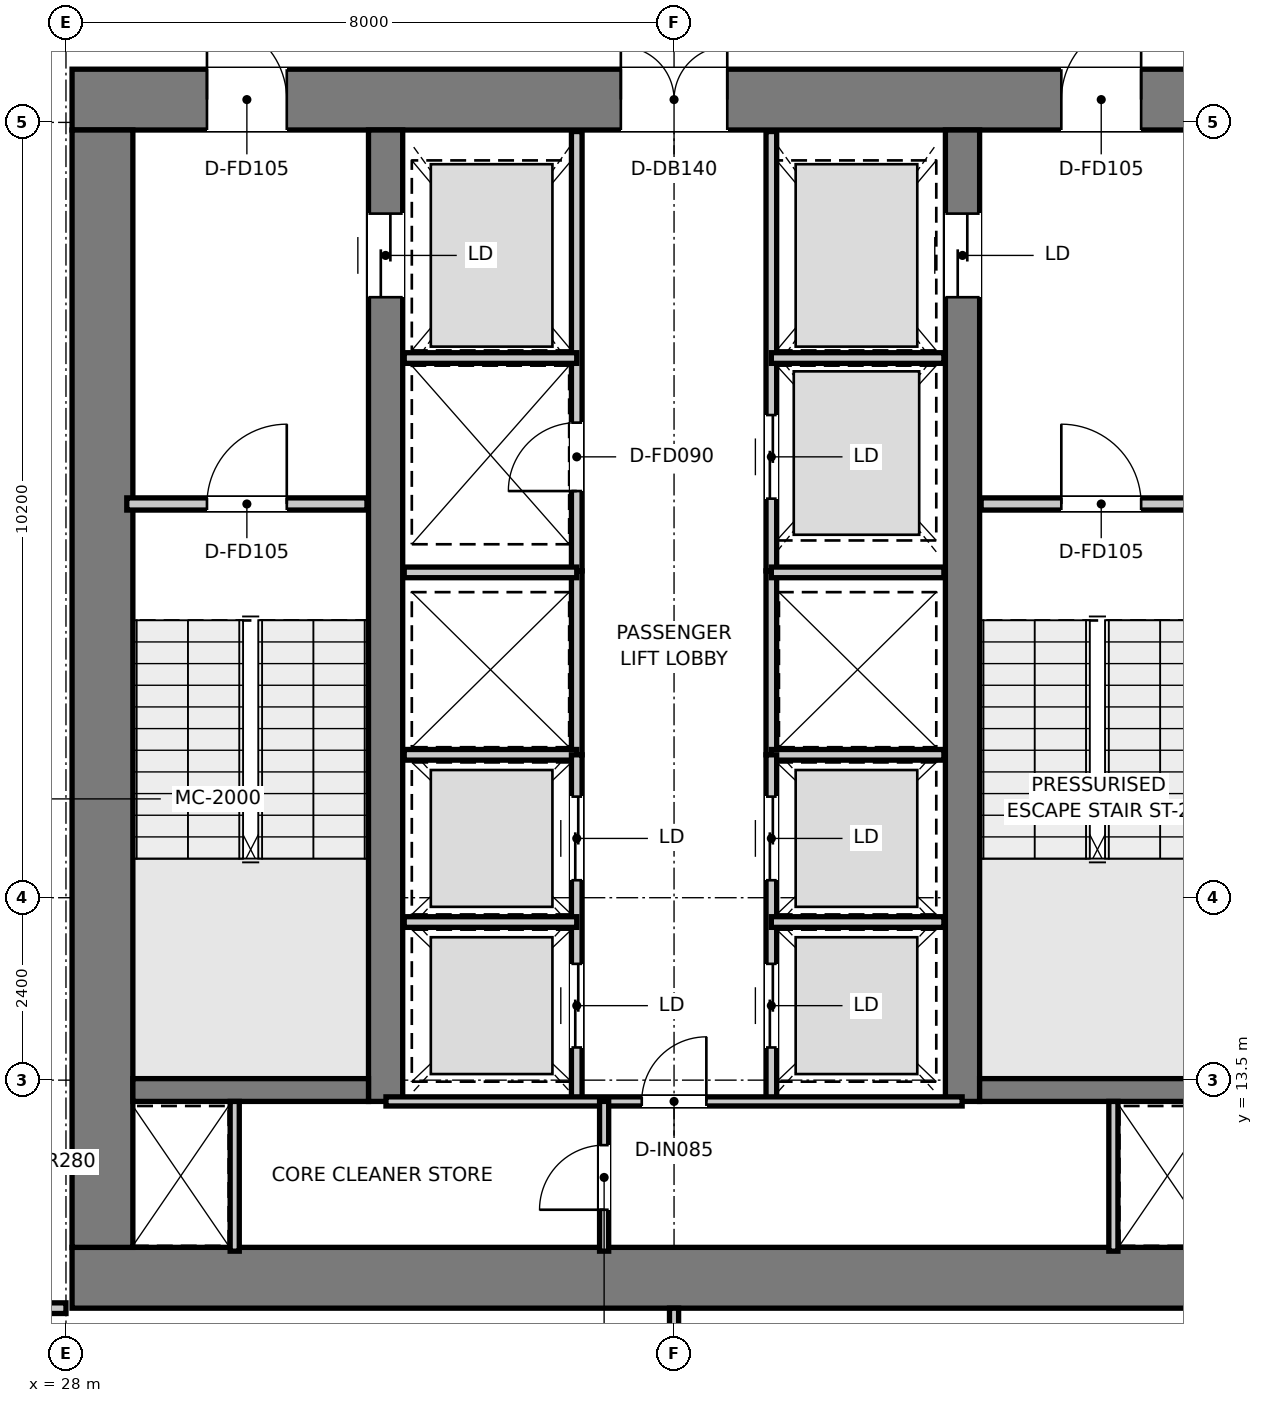
"""IFC4 building model, lengths in metres.
Left out: names, types, materials, properties, quantities, classifications, styles, units other than length and angle.
Written with IfcOpenShell. Run it as: python <this file> out.ifc"""

import sys

from ifc_helpers import new_model, si_unit, direction, frame, frame_2d, origin, place, context, subcontext, project, spatial, rectangle, extrude, element, fill, save


model = new_model("IFC4")
c1 = context("Model", 3, precision=1e-05, world=origin(), true_north=direction((0.0, 1.0)))
c2 = subcontext(c1, "Body", "Model", "MODEL_VIEW")
j1 = project(units=[si_unit("LENGTHUNIT", "METRE"), si_unit("PLANEANGLEUNIT", "RADIAN")], contexts=[c1])
p1 = place(None, origin())
s1 = spatial("IfcSite", under=j1, at=p1, CompositionType="ELEMENT")
p2 = place(p1, origin())
s2 = spatial("IfcBuilding", under=s1, at=p2, CompositionType="ELEMENT")
p3 = place(p2, frame((0.0, 0.0, 97.95)))
s3 = spatial("IfcBuildingStorey", under=s2, at=p3, CompositionType="ELEMENT", Elevation=97.95)
p4 = place(p3, frame((28.08, 10.9, 0.0), z_axis=(0.0, 0.0, 1.0), x_axis=(1.0, 0.0, 0.0)))
e1 = element("IfcWall", 1, at=p4, inside=s3, PredefinedType="SHEAR", context=c2, shape_type="SweptSolid", body=[
    extrude(rectangle(XDim=15.84, YDim=0.8, at=frame_2d((7.92, 0.0))), origin(), (0.0, 0.0, 1.0), 3.95),
])
p5 = place(p3, frame((28.08, 26.4, 0.0), z_axis=(0.0, 0.0, 1.0), x_axis=(1.0, 0.0, 0.0)))
e2 = element("IfcWall", 2, at=p5, inside=s3, PredefinedType="SHEAR", context=c2, shape_type="SweptSolid", body=[
    extrude(rectangle(XDim=15.84, YDim=0.8, at=frame_2d((7.92, 0.0))), origin(), (0.0, 0.0, 1.0), 3.95),
])
p6 = place(p5, frame((7.22, 0.0, 0.0)))
e3 = element("IfcOpeningElement", 3, at=p6, cuts=e2, PredefinedType="OPENING", context=c2, shape_type="SweptSolid", body=[
    extrude(rectangle(XDim=1.4, YDim=2.2, at=frame_2d((0.7, 1.1))), frame((0.0, 0.41, 0.0), z_axis=(0.0, -1.0, 0.0), x_axis=(1.0, 0.0, 0.0)), (0.0, 0.0, 1.0), 0.82),
])
p7 = place(p5, frame((1.775, 0.0, 0.0)))
e4 = element("IfcOpeningElement", 4, at=p7, cuts=e2, PredefinedType="OPENING", context=c2, shape_type="SweptSolid", body=[
    extrude(rectangle(XDim=1.05, YDim=2.1, at=frame_2d((0.525, 1.05))), frame((0.0, 0.41, 0.0), z_axis=(0.0, -1.0, 0.0), x_axis=(1.0, 0.0, 0.0)), (0.0, 0.0, 1.0), 0.82),
])
p8 = place(p5, frame((13.015, 0.0, 0.0)))
e5 = element("IfcOpeningElement", 5, at=p8, cuts=e2, PredefinedType="OPENING", context=c2, shape_type="SweptSolid", body=[
    extrude(rectangle(XDim=1.05, YDim=2.1, at=frame_2d((0.525, 1.05))), frame((0.0, 0.41, 0.0), z_axis=(0.0, -1.0, 0.0), x_axis=(1.0, 0.0, 0.0)), (0.0, 0.0, 1.0), 0.82),
])
p9 = place(p3, frame((28.48, 11.3, 0.0), z_axis=(0.0, 0.0, 1.0), x_axis=(0.0, 1.0, 0.0)))
e6 = element("IfcWall", 6, at=p9, inside=s3, PredefinedType="SHEAR", context=c2, shape_type="SweptSolid", body=[
    extrude(rectangle(XDim=14.7, YDim=0.8, at=frame_2d((7.35, 0.0))), origin(), (0.0, 0.0, 1.0), 3.95),
])
p10 = place(p3, frame((32.205, 13.22, 0.0), z_axis=(0.0, 0.0, 1.0), x_axis=(0.0, 1.0, 0.0)))
e7 = element("IfcWall", 7, at=p10, inside=s3, PredefinedType="SHEAR", context=c2, shape_type="SweptSolid", body=[
    extrude(rectangle(XDim=12.78, YDim=0.45, at=frame_2d((6.39, 0.0))), origin(), (0.0, 0.0, 1.0), 3.95),
])
p11 = place(p10, frame((10.58, 0.0, 0.0)))
e8 = element("IfcOpeningElement", 8, at=p11, cuts=e7, PredefinedType="OPENING", context=c2, shape_type="SweptSolid", body=[
    extrude(rectangle(XDim=1.1, YDim=2.15, at=frame_2d((0.55, 1.075))), frame((0.0, 0.235, 0.0), z_axis=(0.0, -1.0, 0.0), x_axis=(1.0, 0.0, 0.0)), (0.0, 0.0, 1.0), 0.47),
])
p12 = place(p3, frame((39.795, 13.22, 0.0), z_axis=(0.0, 0.0, 1.0), x_axis=(0.0, 1.0, 0.0)))
e9 = element("IfcWall", 9, at=p12, inside=s3, PredefinedType="SHEAR", context=c2, shape_type="SweptSolid", body=[
    extrude(rectangle(XDim=12.78, YDim=0.45, at=frame_2d((6.39, 0.0))), origin(), (0.0, 0.0, 1.0), 3.95),
])
p13 = place(p12, frame((10.58, 0.0, 0.0)))
e10 = element("IfcOpeningElement", 10, at=p13, cuts=e9, PredefinedType="OPENING", context=c2, shape_type="SweptSolid", body=[
    extrude(rectangle(XDim=1.1, YDim=2.15, at=frame_2d((0.55, 1.075))), frame((0.0, 0.235, 0.0), z_axis=(0.0, -1.0, 0.0), x_axis=(1.0, 0.0, 0.0)), (0.0, 0.0, 1.0), 0.47),
])
for number, where, z_axis, x_axis in (
    (11, (28.88, 13.37, 0.0), (0.0, 0.0, 1.0), (1.0, 0.0, 0.0)),
    (12, (40.02, 13.37, 0.0), (0.0, 0.0, 1.0), (1.0, 0.0, 0.0)),
):
    element("IfcWall", number, at=place(p3, frame(where, z_axis=z_axis, x_axis=x_axis)), inside=s3, PredefinedType="SHEAR", context=c2, shape_type="SweptSolid", body=[
        extrude(rectangle(XDim=3.1, YDim=0.3, at=frame_2d((1.55, 0.0))), origin(), (0.0, 0.0, 1.0), 3.95),
    ])
p14 = place(p3, frame((28.8, 21.08, 0.0), z_axis=(0.0, 0.0, 1.0), x_axis=(1.0, 0.0, 0.0)))
e13 = element("IfcWall", 13, at=p14, inside=s3, PredefinedType="PARTITIONING", context=c2, shape_type="SweptSolid", body=[
    extrude(rectangle(XDim=3.16, YDim=0.16, at=frame_2d((1.58, 0.0))), origin(), (0.0, 0.0, 1.0), 3.67),
])
p15 = place(p14, frame((1.055, 0.0, 0.0)))
e14 = element("IfcOpeningElement", 14, at=p15, cuts=e13, PredefinedType="OPENING", context=c2, shape_type="SweptSolid", body=[
    extrude(rectangle(XDim=1.05, YDim=2.1, at=frame_2d((0.525, 1.05))), frame((0.0, 0.09, 0.0), z_axis=(0.0, -1.0, 0.0), x_axis=(1.0, 0.0, 0.0)), (0.0, 0.0, 1.0), 0.18),
])
p16 = place(p3, frame((40.04, 21.08, 0.0), z_axis=(0.0, 0.0, 1.0), x_axis=(1.0, 0.0, 0.0)))
e15 = element("IfcWall", 15, at=p16, inside=s3, PredefinedType="PARTITIONING", context=c2, shape_type="SweptSolid", body=[
    extrude(rectangle(XDim=3.16, YDim=0.16, at=frame_2d((1.58, 0.0))), origin(), (0.0, 0.0, 1.0), 3.67),
])
p17 = place(p16, frame((1.055, 0.0, 0.0)))
e16 = element("IfcOpeningElement", 16, at=p17, cuts=e15, PredefinedType="OPENING", context=c2, shape_type="SweptSolid", body=[
    extrude(rectangle(XDim=1.05, YDim=2.1, at=frame_2d((0.525, 1.05))), frame((0.0, 0.09, 0.0), z_axis=(0.0, -1.0, 0.0), x_axis=(1.0, 0.0, 0.0)), (0.0, 0.0, 1.0), 0.18),
])
p18 = place(p3, frame((34.72, 20.2, 0.0), z_axis=(0.0, 0.0, 1.0), x_axis=(0.0, 1.0, 0.0)))
e17 = element("IfcWall", 17, at=p18, inside=s3, PredefinedType="PARTITIONING", context=c2, shape_type="SweptSolid", body=[
    extrude(rectangle(XDim=5.78, YDim=0.14, at=frame_2d((2.89, 0.0))), origin(), (0.0, 0.0, 1.0), 2.47),
])
p19 = place(p18, frame((1.05, 0.0, 0.0)))
e18 = element("IfcOpeningElement", 18, at=p19, cuts=e17, PredefinedType="OPENING", context=c2, shape_type="SweptSolid", body=[
    extrude(rectangle(XDim=0.9, YDim=2.1, at=frame_2d((0.45, 1.05))), frame((0.0, 0.08, 0.0), z_axis=(0.0, -1.0, 0.0), x_axis=(1.0, 0.0, 0.0)), (0.0, 0.0, 1.0), 0.16),
])
p20 = place(p3, frame((37.28, 20.2, 0.0), z_axis=(0.0, 0.0, 1.0), x_axis=(0.0, 1.0, 0.0)))
e19 = element("IfcWall", 19, at=p20, inside=s3, PredefinedType="PARTITIONING", context=c2, shape_type="SweptSolid", body=[
    extrude(rectangle(XDim=5.78, YDim=0.14, at=frame_2d((2.89, 0.0))), origin(), (0.0, 0.0, 1.0), 2.47),
])
p21 = place(p20, frame((0.95, 0.0, 0.0)))
e20 = element("IfcOpeningElement", 20, at=p21, cuts=e19, PredefinedType="OPENING", context=c2, shape_type="SweptSolid", body=[
    extrude(rectangle(XDim=1.1, YDim=2.15, at=frame_2d((0.55, 1.075))), frame((0.0, 0.08, 0.0), z_axis=(0.0, -1.0, 0.0), x_axis=(1.0, 0.0, 0.0)), (0.0, 0.0, 1.0), 0.16),
])
for number, where, z_axis, x_axis in (
    (21, (32.45, 23.0, 0.0), (0.0, 0.0, 1.0), (1.0, 0.0, 0.0)),
    (22, (37.28, 23.0, 0.0), (0.0, 0.0, 1.0), (1.0, 0.0, 0.0)),
):
    element("IfcWall", number, at=place(p3, frame(where, z_axis=z_axis, x_axis=x_axis)), inside=s3, PredefinedType="PARTITIONING", context=c2, shape_type="SweptSolid", body=[
        extrude(rectangle(XDim=2.27, YDim=0.14, at=frame_2d((1.135, 0.0))), origin(), (0.0, 0.0, 1.0), 2.47),
    ])
for number, where, z_axis, x_axis in (
    (23, (34.72, 17.78, 0.0), (0.0, 0.0, 1.0), (0.0, 1.0, 0.0)),
    (24, (37.28, 17.78, 0.0), (0.0, 0.0, 1.0), (0.0, 1.0, 0.0)),
):
    element("IfcWall", number, at=place(p3, frame(where, z_axis=z_axis, x_axis=x_axis)), inside=s3, PredefinedType="PARTITIONING", context=c2, shape_type="SweptSolid", body=[
        extrude(rectangle(XDim=2.42, YDim=0.14, at=frame_2d((1.21, 0.0))), origin(), (0.0, 0.0, 1.0), 3.67),
    ])
for number, where, z_axis, x_axis in (
    (25, (32.45, 17.78, 0.0), (0.0, 0.0, 1.0), (1.0, 0.0, 0.0)),
    (26, (32.45, 20.18, 0.0), (0.0, 0.0, 1.0), (1.0, 0.0, 0.0)),
    (27, (37.28, 17.78, 0.0), (0.0, 0.0, 1.0), (1.0, 0.0, 0.0)),
    (28, (37.28, 20.18, 0.0), (0.0, 0.0, 1.0), (1.0, 0.0, 0.0)),
):
    element("IfcWall", number, at=place(p3, frame(where, z_axis=z_axis, x_axis=x_axis)), inside=s3, PredefinedType="PARTITIONING", context=c2, shape_type="SweptSolid", body=[
        extrude(rectangle(XDim=2.27, YDim=0.14, at=frame_2d((1.135, 0.0))), origin(), (0.0, 0.0, 1.0), 3.67),
    ])
p22 = place(p3, frame((34.72, 13.22, 0.0), z_axis=(0.0, 0.0, 1.0), x_axis=(0.0, 1.0, 0.0)))
e29 = element("IfcWall", 29, at=p22, inside=s3, PredefinedType="PARTITIONING", context=c2, shape_type="SweptSolid", body=[
    extrude(rectangle(XDim=4.56, YDim=0.14, at=frame_2d((2.28, 0.0))), origin(), (0.0, 0.0, 1.0), 3.67),
])
p23 = place(p22, frame((0.71, 0.0, 0.0)))
e30 = element("IfcOpeningElement", 30, at=p23, cuts=e29, PredefinedType="OPENING", context=c2, shape_type="SweptSolid", body=[
    extrude(rectangle(XDim=1.1, YDim=2.15, at=frame_2d((0.55, 1.075))), frame((0.0, 0.08, 0.0), z_axis=(0.0, -1.0, 0.0), x_axis=(1.0, 0.0, 0.0)), (0.0, 0.0, 1.0), 0.16),
])
p24 = place(p22, frame((2.91, 0.0, 0.0)))
e31 = element("IfcOpeningElement", 31, at=p24, cuts=e29, PredefinedType="OPENING", context=c2, shape_type="SweptSolid", body=[
    extrude(rectangle(XDim=1.1, YDim=2.15, at=frame_2d((0.55, 1.075))), frame((0.0, 0.08, 0.0), z_axis=(0.0, -1.0, 0.0), x_axis=(1.0, 0.0, 0.0)), (0.0, 0.0, 1.0), 0.16),
])
p25 = place(p3, frame((32.45, 15.58, 0.0), z_axis=(0.0, 0.0, 1.0), x_axis=(1.0, 0.0, 0.0)))
e32 = element("IfcWall", 32, at=p25, inside=s3, PredefinedType="PARTITIONING", context=c2, shape_type="SweptSolid", body=[
    extrude(rectangle(XDim=2.27, YDim=0.14, at=frame_2d((1.135, 0.0))), origin(), (0.0, 0.0, 1.0), 3.67),
])
p26 = place(p3, frame((37.28, 13.22, 0.0), z_axis=(0.0, 0.0, 1.0), x_axis=(0.0, 1.0, 0.0)))
e33 = element("IfcWall", 33, at=p26, inside=s3, PredefinedType="PARTITIONING", context=c2, shape_type="SweptSolid", body=[
    extrude(rectangle(XDim=4.56, YDim=0.14, at=frame_2d((2.28, 0.0))), origin(), (0.0, 0.0, 1.0), 3.67),
])
p27 = place(p26, frame((0.71, 0.0, 0.0)))
e34 = element("IfcOpeningElement", 34, at=p27, cuts=e33, PredefinedType="OPENING", context=c2, shape_type="SweptSolid", body=[
    extrude(rectangle(XDim=1.1, YDim=2.15, at=frame_2d((0.55, 1.075))), frame((0.0, 0.08, 0.0), z_axis=(0.0, -1.0, 0.0), x_axis=(1.0, 0.0, 0.0)), (0.0, 0.0, 1.0), 0.16),
])
p28 = place(p26, frame((2.91, 0.0, 0.0)))
e35 = element("IfcOpeningElement", 35, at=p28, cuts=e33, PredefinedType="OPENING", context=c2, shape_type="SweptSolid", body=[
    extrude(rectangle(XDim=1.1, YDim=2.15, at=frame_2d((0.55, 1.075))), frame((0.0, 0.08, 0.0), z_axis=(0.0, -1.0, 0.0), x_axis=(1.0, 0.0, 0.0)), (0.0, 0.0, 1.0), 0.16),
])
p29 = place(p3, frame((37.28, 15.58, 0.0), z_axis=(0.0, 0.0, 1.0), x_axis=(1.0, 0.0, 0.0)))
e36 = element("IfcWall", 36, at=p29, inside=s3, PredefinedType="PARTITIONING", context=c2, shape_type="SweptSolid", body=[
    extrude(rectangle(XDim=2.27, YDim=0.14, at=frame_2d((1.135, 0.0))), origin(), (0.0, 0.0, 1.0), 3.67),
])
for number, where, z_axis, x_axis in (
    (37, (30.22, 11.25, 0.0), (0.0, 0.0, 1.0), (0.0, 1.0, 0.0)),
    (38, (41.78, 11.25, 0.0), (0.0, 0.0, 1.0), (0.0, 1.0, 0.0)),
):
    element("IfcWall", number, at=place(p3, frame(where, z_axis=z_axis, x_axis=x_axis)), inside=s3, PredefinedType="PARTITIONING", context=c2, shape_type="SweptSolid", body=[
        extrude(rectangle(XDim=1.97, YDim=0.12, at=frame_2d((0.985, 0.0))), origin(), (0.0, 0.0, 1.0), 3.67),
    ])
p30 = place(p3, frame((32.21, 13.22, 0.0), z_axis=(0.0, 0.0, 1.0), x_axis=(1.0, 0.0, 0.0)))
e39 = element("IfcWall", 39, at=p30, inside=s3, PredefinedType="PARTITIONING", context=c2, shape_type="SweptSolid", body=[
    extrude(rectangle(XDim=7.58, YDim=0.12, at=frame_2d((3.79, 0.0))), origin(), (0.0, 0.0, 1.0), 3.67),
])
p31 = place(p30, frame((3.365, 0.0, 0.0)))
e40 = element("IfcOpeningElement", 40, at=p31, cuts=e39, PredefinedType="OPENING", context=c2, shape_type="SweptSolid", body=[
    extrude(rectangle(XDim=0.85, YDim=2.1, at=frame_2d((0.425, 1.05))), frame((0.0, 0.07, 0.0), z_axis=(0.0, -1.0, 0.0), x_axis=(1.0, 0.0, 0.0)), (0.0, 0.0, 1.0), 0.14),
])
p32 = place(p3, frame((35.08, 11.25, 0.0), z_axis=(0.0, 0.0, 1.0), x_axis=(0.0, 1.0, 0.0)))
e41 = element("IfcWall", 41, at=p32, inside=s3, PredefinedType="PARTITIONING", context=c2, shape_type="SweptSolid", body=[
    extrude(rectangle(XDim=1.97, YDim=0.12, at=frame_2d((0.985, 0.0))), origin(), (0.0, 0.0, 1.0), 3.67),
])
p33 = place(p32, frame((0.545, 0.0, 0.0)))
e42 = element("IfcOpeningElement", 42, at=p33, cuts=e41, PredefinedType="OPENING", context=c2, shape_type="SweptSolid", body=[
    extrude(rectangle(XDim=0.85, YDim=2.1, at=frame_2d((0.425, 1.05))), frame((0.0, 0.07, 0.0), z_axis=(0.0, -1.0, 0.0), x_axis=(1.0, 0.0, 0.0)), (0.0, 0.0, 1.0), 0.14),
])
p34 = place(p3, frame((26.32, 10.5, 0.0), z_axis=(0.0, 0.0, 1.0), x_axis=(1.0, 0.0, 0.0)))
e43 = element("IfcWall", 43, at=p34, inside=s3, PredefinedType="PARTITIONING", context=c2, shape_type="SweptSolid", body=[
    extrude(rectangle(XDim=1.68, YDim=0.14, at=frame_2d((0.84, 0.0))), origin(), (0.0, 0.0, 1.0), 3.67),
])
p35 = place(p34, frame((0.445, 0.0, 0.0)))
e44 = element("IfcOpeningElement", 44, at=p35, cuts=e43, PredefinedType="OPENING", context=c2, shape_type="SweptSolid", body=[
    extrude(rectangle(XDim=0.85, YDim=2.1, at=frame_2d((0.425, 1.05))), frame((0.0, 0.08, 0.0), z_axis=(0.0, -1.0, 0.0), x_axis=(1.0, 0.0, 0.0)), (0.0, 0.0, 1.0), 0.16),
])
p36 = place(p3, frame((36.0, 2.582, 0.0), z_axis=(0.0, 0.0, 1.0), x_axis=(0.0, 1.0, 0.0)))
e45 = element("IfcWall", 45, at=p36, inside=s3, PredefinedType="PARTITIONING", context=c2, shape_type="SweptSolid", body=[
    extrude(rectangle(XDim=7.918, YDim=0.12, at=frame_2d((3.959, 0.0))), origin(), (0.0, 0.0, 1.0), 3.67),
])
p37 = place(p15, origin())
e46 = element("IfcDoor", 46, at=p37, inside=s3, OperationType="SINGLE_SWING_RIGHT", PredefinedType="DOOR", context=c2, shape_type="SweptSolid", body=[
    extrude(rectangle(XDim=1.05, YDim=2.1, at=frame_2d((0.525, 1.05))), frame((0.0, 0.025, 0.0), z_axis=(0.0, -1.0, 0.0), x_axis=(1.0, 0.0, 0.0)), (0.0, 0.0, 1.0), 0.05),
])
fill(e14, e46)
p38 = place(p17, origin())
e47 = element("IfcDoor", 47, at=p38, inside=s3, OperationType="SINGLE_SWING_LEFT", PredefinedType="DOOR", context=c2, shape_type="SweptSolid", body=[
    extrude(rectangle(XDim=1.05, YDim=2.1, at=frame_2d((0.525, 1.05))), frame((0.0, 0.025, 0.0), z_axis=(0.0, -1.0, 0.0), x_axis=(1.0, 0.0, 0.0)), (0.0, 0.0, 1.0), 0.05),
])
fill(e16, e47)
p39 = place(p6, origin())
e48 = element("IfcDoor", 48, at=p39, inside=s3, OperationType="DOUBLE_DOOR_SINGLE_SWING", PredefinedType="DOOR", context=c2, shape_type="SweptSolid", body=[
    extrude(rectangle(XDim=1.4, YDim=2.2, at=frame_2d((0.7, 1.1))), frame((0.0, 0.025, 0.0), z_axis=(0.0, -1.0, 0.0), x_axis=(1.0, 0.0, 0.0)), (0.0, 0.0, 1.0), 0.05),
])
fill(e3, e48)
p40 = place(p7, origin())
e49 = element("IfcDoor", 49, at=p40, inside=s3, OperationType="SINGLE_SWING_LEFT", PredefinedType="DOOR", context=c2, shape_type="SweptSolid", body=[
    extrude(rectangle(XDim=1.05, YDim=2.1, at=frame_2d((0.525, 1.05))), frame((0.0, 0.025, 0.0), z_axis=(0.0, -1.0, 0.0), x_axis=(1.0, 0.0, 0.0)), (0.0, 0.0, 1.0), 0.05),
])
fill(e4, e49)
p41 = place(p8, origin())
e50 = element("IfcDoor", 50, at=p41, inside=s3, OperationType="SINGLE_SWING_RIGHT", PredefinedType="DOOR", context=c2, shape_type="SweptSolid", body=[
    extrude(rectangle(XDim=1.05, YDim=2.1, at=frame_2d((0.525, 1.05))), frame((0.0, 0.025, 0.0), z_axis=(0.0, -1.0, 0.0), x_axis=(1.0, 0.0, 0.0)), (0.0, 0.0, 1.0), 0.05),
])
fill(e5, e50)
p42 = place(p11, origin())
e51 = element("IfcDoor", 51, at=p42, inside=s3, OperationType="DOUBLE_DOOR_SLIDING", PredefinedType="DOOR", context=c2, shape_type="SweptSolid", body=[
    extrude(rectangle(XDim=1.1, YDim=2.15, at=frame_2d((0.55, 1.075))), frame((0.0, 0.025, 0.0), z_axis=(0.0, -1.0, 0.0), x_axis=(1.0, 0.0, 0.0)), (0.0, 0.0, 1.0), 0.05),
])
fill(e8, e51)
p43 = place(p13, origin())
e52 = element("IfcDoor", 52, at=p43, inside=s3, OperationType="DOUBLE_DOOR_SLIDING", PredefinedType="DOOR", context=c2, shape_type="SweptSolid", body=[
    extrude(rectangle(XDim=1.1, YDim=2.15, at=frame_2d((0.55, 1.075))), frame((0.0, 0.025, 0.0), z_axis=(0.0, -1.0, 0.0), x_axis=(1.0, 0.0, 0.0)), (0.0, 0.0, 1.0), 0.05),
])
fill(e10, e52)
p44 = place(p19, origin())
e53 = element("IfcDoor", 53, at=p44, inside=s3, OperationType="SINGLE_SWING_LEFT", PredefinedType="DOOR", context=c2, shape_type="SweptSolid", body=[
    extrude(rectangle(XDim=0.9, YDim=2.1, at=frame_2d((0.45, 1.05))), frame((0.0, 0.025, 0.0), z_axis=(0.0, -1.0, 0.0), x_axis=(1.0, 0.0, 0.0)), (0.0, 0.0, 1.0), 0.05),
])
fill(e18, e53)
p45 = place(p21, origin())
e54 = element("IfcDoor", 54, at=p45, inside=s3, OperationType="DOUBLE_DOOR_SLIDING", PredefinedType="DOOR", context=c2, shape_type="SweptSolid", body=[
    extrude(rectangle(XDim=1.1, YDim=2.15, at=frame_2d((0.55, 1.075))), frame((0.0, 0.025, 0.0), z_axis=(0.0, -1.0, 0.0), x_axis=(1.0, 0.0, 0.0)), (0.0, 0.0, 1.0), 0.05),
])
fill(e20, e54)
p46 = place(p23, origin())
e55 = element("IfcDoor", 55, at=p46, inside=s3, OperationType="DOUBLE_DOOR_SLIDING", PredefinedType="DOOR", context=c2, shape_type="SweptSolid", body=[
    extrude(rectangle(XDim=1.1, YDim=2.15, at=frame_2d((0.55, 1.075))), frame((0.0, 0.025, 0.0), z_axis=(0.0, -1.0, 0.0), x_axis=(1.0, 0.0, 0.0)), (0.0, 0.0, 1.0), 0.05),
])
fill(e30, e55)
p47 = place(p24, origin())
e56 = element("IfcDoor", 56, at=p47, inside=s3, OperationType="DOUBLE_DOOR_SLIDING", PredefinedType="DOOR", context=c2, shape_type="SweptSolid", body=[
    extrude(rectangle(XDim=1.1, YDim=2.15, at=frame_2d((0.55, 1.075))), frame((0.0, 0.025, 0.0), z_axis=(0.0, -1.0, 0.0), x_axis=(1.0, 0.0, 0.0)), (0.0, 0.0, 1.0), 0.05),
])
fill(e31, e56)
p48 = place(p27, origin())
e57 = element("IfcDoor", 57, at=p48, inside=s3, OperationType="DOUBLE_DOOR_SLIDING", PredefinedType="DOOR", context=c2, shape_type="SweptSolid", body=[
    extrude(rectangle(XDim=1.1, YDim=2.15, at=frame_2d((0.55, 1.075))), frame((0.0, 0.025, 0.0), z_axis=(0.0, -1.0, 0.0), x_axis=(1.0, 0.0, 0.0)), (0.0, 0.0, 1.0), 0.05),
])
fill(e34, e57)
p49 = place(p28, origin())
e58 = element("IfcDoor", 58, at=p49, inside=s3, OperationType="DOUBLE_DOOR_SLIDING", PredefinedType="DOOR", context=c2, shape_type="SweptSolid", body=[
    extrude(rectangle(XDim=1.1, YDim=2.15, at=frame_2d((0.55, 1.075))), frame((0.0, 0.025, 0.0), z_axis=(0.0, -1.0, 0.0), x_axis=(1.0, 0.0, 0.0)), (0.0, 0.0, 1.0), 0.05),
])
fill(e35, e58)
p50 = place(p31, origin())
e59 = element("IfcDoor", 59, at=p50, inside=s3, OperationType="SINGLE_SWING_RIGHT", PredefinedType="DOOR", context=c2, shape_type="SweptSolid", body=[
    extrude(rectangle(XDim=0.85, YDim=2.1, at=frame_2d((0.425, 1.05))), frame((0.0, 0.025, 0.0), z_axis=(0.0, -1.0, 0.0), x_axis=(1.0, 0.0, 0.0)), (0.0, 0.0, 1.0), 0.05),
])
fill(e40, e59)
p51 = place(p33, origin())
e60 = element("IfcDoor", 60, at=p51, inside=s3, OperationType="SINGLE_SWING_LEFT", PredefinedType="DOOR", context=c2, shape_type="SweptSolid", body=[
    extrude(rectangle(XDim=0.85, YDim=2.1, at=frame_2d((0.425, 1.05))), frame((0.0, 0.025, 0.0), z_axis=(0.0, -1.0, 0.0), x_axis=(1.0, 0.0, 0.0)), (0.0, 0.0, 1.0), 0.05),
])
fill(e42, e60)
save(model, sys.argv[1])
